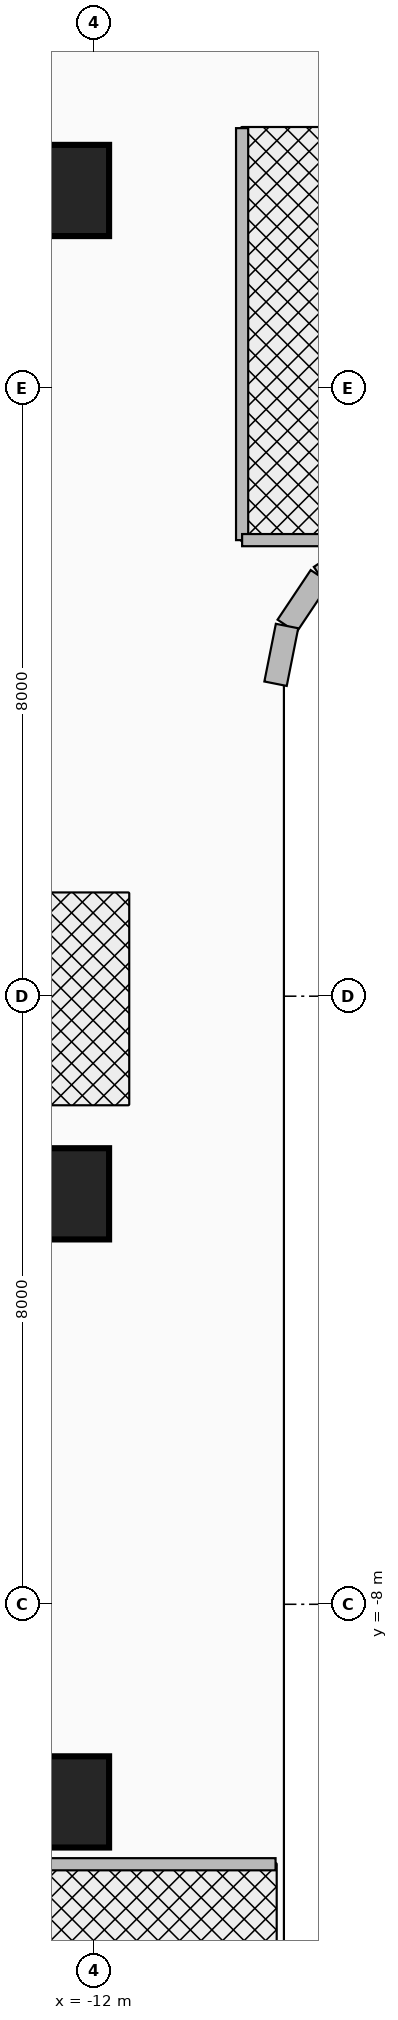
"""IFC4 building model, lengths in metres.
Left out: names, types, materials, properties, quantities, classifications, styles, units other than length and angle.
Written with IfcOpenShell. Run it as: python <this file> out.ifc"""

import sys

from ifc_helpers import new_model, si_unit, direction, frame, frame_2d, origin, origin_2d, place, context, subcontext, project, spatial, rectangle, extrude, source, transform, mapped, element, fill, save


model = new_model("IFC4")
c1 = context("Model", 3, precision=1e-05, world=origin(), true_north=direction((0.0, 1.0)))
c2 = subcontext(c1, "Body", "Model", "MODEL_VIEW")
j1 = project(units=[si_unit("LENGTHUNIT", "METRE"), si_unit("PLANEANGLEUNIT", "RADIAN")], contexts=[c1])
p1 = place(None, origin())
s1 = spatial("IfcSite", under=j1, at=p1, CompositionType="ELEMENT")
p2 = place(p1, origin())
s2 = spatial("IfcBuilding", under=s1, at=p2, CompositionType="ELEMENT")
p3 = place(p2, frame((0.0, 0.0, 153.8)))
s3 = spatial("IfcBuildingStorey", under=s2, at=p3, CompositionType="ELEMENT", Elevation=153.8)
for number, where, z_axis, x_axis in (
    (1, (-22.65, 10.8, 0.0), (0.0, 0.0, 1.0), (1.0, 0.0, 0.0)),
    (2, (-22.65, -10.8, 0.0), (0.0, 0.0, 1.0), (1.0, 0.0, 0.0)),
):
    element("IfcWall", number, at=place(p3, frame(where, z_axis=z_axis, x_axis=x_axis)), inside=s3, PredefinedType="SHEAR", context=c2, shape_type="SweptSolid", body=[
        extrude(rectangle(XDim=10.25, YDim=0.55, at=frame_2d((5.125, 0.0))), origin(), (0.0, 0.0, 1.0), 3.46),
    ])
m1 = source(origin(), c2, "Body", "SweptSolid", [
    extrude(rectangle(XDim=1.2, YDim=1.2, at=origin_2d()), origin(), (0.0, 0.0, 1.0), 3.7),
])
for number, where, z_axis, x_axis in (
    (3, (-12.4, -10.6, 0.0), (0.0, 0.0, 1.0), (1.0, 0.0, 0.0)),
    (4, (-12.4, -2.6, 0.0), (0.0, 0.0, 1.0), (1.0, 0.0, 0.0)),
    (5, (-12.4, 10.6, 0.0), (0.0, 0.0, 1.0), (1.0, 0.0, 0.0)),
):
    element("IfcColumn", number, at=place(p3, frame(where, z_axis=z_axis, x_axis=x_axis)), inside=s3, PredefinedType="COLUMN", context=c2, shape_type="MappedRepresentation", body=[
        mapped(m1, transform((0.0, 0.0, 0.0), x_axis=(1.0, 0.0, 0.0), y_axis=(0.0, 1.0, 0.0), z_axis=(0.0, 0.0, 1.0), scale=1.0)),
    ])
for number, where, z_axis, x_axis in (
    (6, (-8.37, 5.959, 0.0), (0.0, 0.0, 1.0), (-0.831, -0.556, 0.0)),
    (7, (-9.023, 5.523, 0.0), (0.0, 0.0, 1.0), (-0.556, -0.831, 0.0)),
):
    element("IfcWall", number, at=place(p3, frame(where, z_axis=z_axis, x_axis=x_axis)), inside=s3, PredefinedType="SOLIDWALL", context=c2, shape_type="SweptSolid", body=[
        extrude(rectangle(XDim=0.785, YDim=0.3, at=frame_2d((0.393, 0.0))), origin(), (0.0, 0.0, 1.0), 3.46),
    ])
p4 = place(p3, frame((-9.459, 4.87, 0.0), z_axis=(0.0, 0.0, 1.0), x_axis=(-0.195206365311, -0.98076219082, 0.0)))
e8 = element("IfcWall", 8, at=p4, inside=s3, PredefinedType="SOLIDWALL", context=c2, shape_type="SweptSolid", body=[
    extrude(rectangle(XDim=0.774, YDim=0.3, at=frame_2d((0.387, 0.0))), origin(), (0.0, 0.0, 1.0), 3.46),
])
p5 = place(p3, frame((-23.45, -11.42, 0.0), z_axis=(0.0, 0.0, 1.0), x_axis=(1.0, 0.0, 0.0)))
e9 = element("IfcWall", 9, at=p5, inside=s3, PredefinedType="PARTITIONING", context=c2, shape_type="SweptSolid", body=[
    extrude(rectangle(XDim=13.84, YDim=0.16, at=frame_2d((6.92, 0.0))), origin(), (0.0, 0.0, 1.0), 2.834),
])
p6 = place(p3, frame((-10.05, 6.0, 0.0), z_axis=(0.0, 0.0, 1.0), x_axis=(0.0, 1.0, 0.0)))
e10 = element("IfcWall", 10, at=p6, inside=s3, PredefinedType="PARTITIONING", context=c2, shape_type="SweptSolid", body=[
    extrude(rectangle(XDim=5.42, YDim=0.16, at=frame_2d((2.71, 0.0))), origin(), (0.0, 0.0, 1.0), 3.46),
])
p7 = place(p6, frame((2.26, 0.0, 0.0)))
e11 = element("IfcOpeningElement", 11, at=p7, cuts=e10, PredefinedType="OPENING", context=c2, shape_type="SweptSolid", body=[
    extrude(rectangle(XDim=0.9, YDim=2.1, at=frame_2d((0.45, 1.05))), frame((0.0, 0.095, 0.0), z_axis=(0.0, -1.0, 0.0), x_axis=(1.0, 0.0, 0.0)), (0.0, 0.0, 1.0), 0.19),
])
p8 = place(p3, frame((-10.05, 6.0, 0.0), z_axis=(0.0, 0.0, 1.0), x_axis=(1.0, 0.0, 0.0)))
e12 = element("IfcWall", 12, at=p8, inside=s3, PredefinedType="PARTITIONING", context=c2, shape_type="SweptSolid", body=[
    extrude(rectangle(XDim=1.516, YDim=0.16, at=frame_2d((0.758, 0.0))), origin(), (0.0, 0.0, 1.0), 3.46),
])
p9 = place(p7, frame((0.9, 0.0, 0.0), z_axis=(0.0, 0.0, 1.0), x_axis=(-1.0, 0.0, 0.0)))
e13 = element("IfcDoor", 13, at=p9, inside=s3, OperationType="SINGLE_SWING_LEFT", PredefinedType="DOOR", context=c2, shape_type="SweptSolid", body=[
    extrude(rectangle(XDim=0.9, YDim=2.1, at=frame_2d((0.45, 1.05))), frame((0.0, 0.025, 0.0), z_axis=(0.0, -1.0, 0.0), x_axis=(1.0, 0.0, 0.0)), (0.0, 0.0, 1.0), 0.05),
])
fill(e11, e13)
save(model, sys.argv[1])
